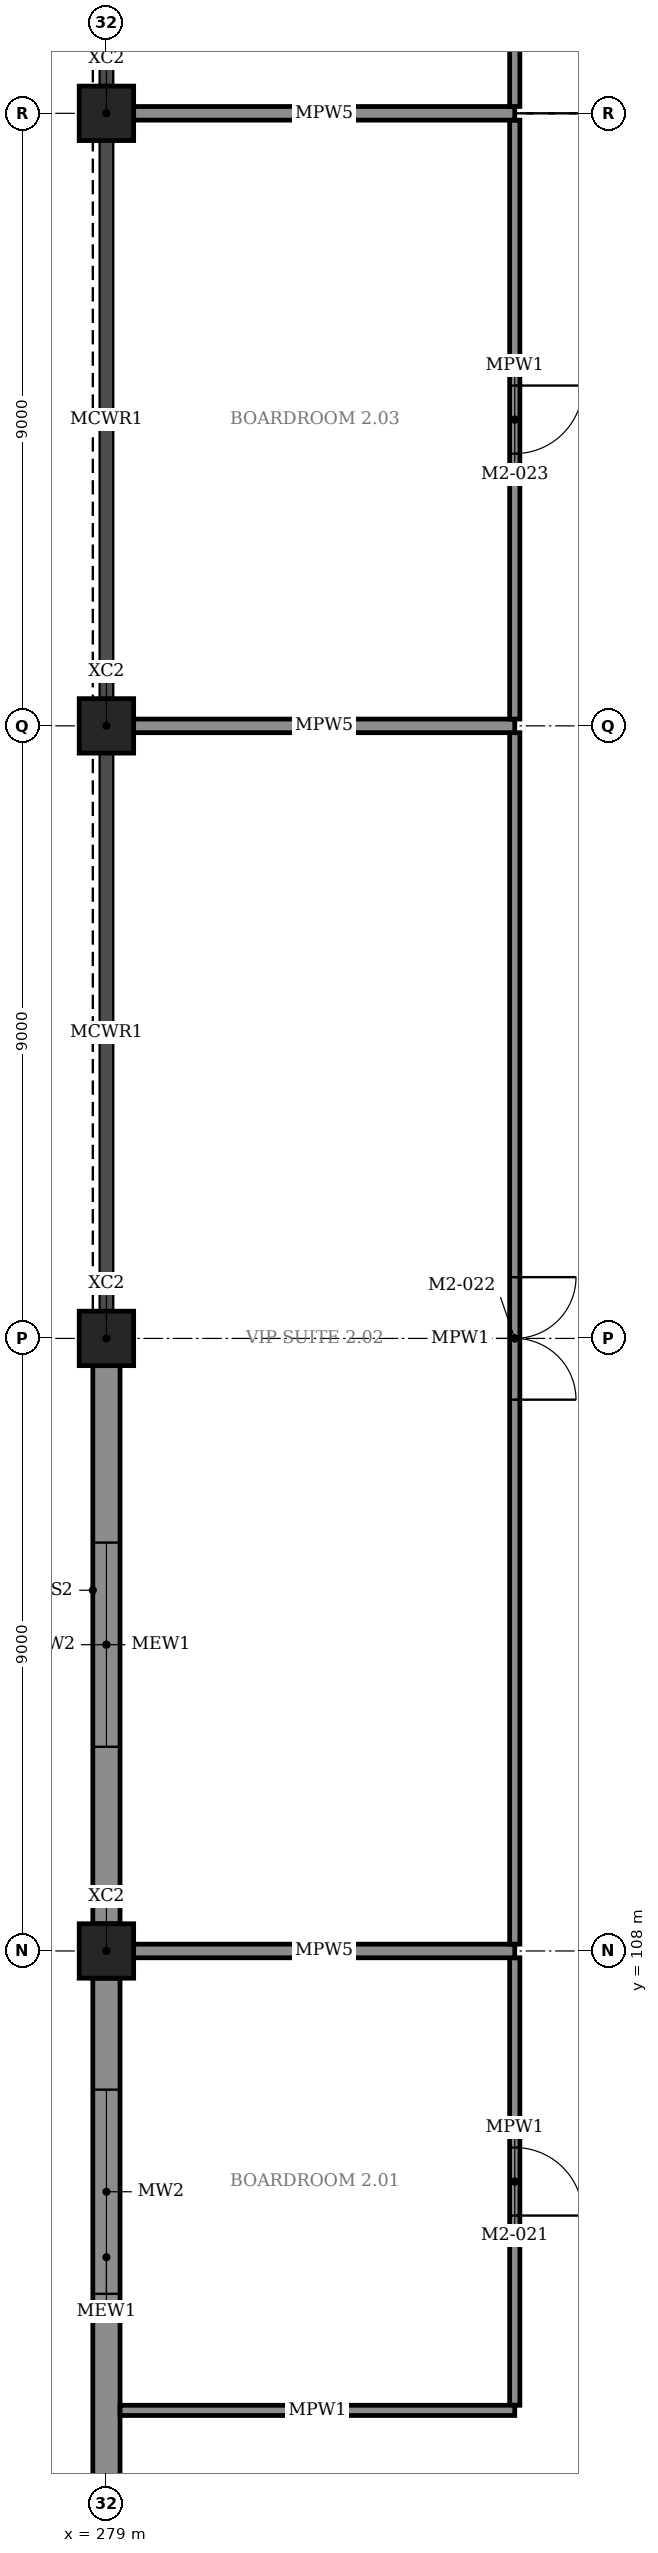
"""IFC4 building model, lengths in metres.
Left out: names, types, materials, properties, quantities, classifications, styles, units other than length and angle.
Written with IfcOpenShell. Run it as: python <this file> out.ifc"""

import sys

from ifc_helpers import new_model, si_unit, direction, frame, frame_2d, origin, origin_2d, place, context, subcontext, project, spatial, rectangle, extrude, element, fill, save


model = new_model("IFC4")
c1 = context("Model", 3, precision=1e-05, world=origin(), true_north=direction((0.0, 1.0)))
c2 = subcontext(c1, "Body", "Model", "MODEL_VIEW")
j1 = project(units=[si_unit("LENGTHUNIT", "METRE"), si_unit("PLANEANGLEUNIT", "RADIAN")], contexts=[c1])
p1 = place(None, origin())
s1 = spatial("IfcSite", under=j1, at=p1, CompositionType="ELEMENT")
p2 = place(p1, origin())
s2 = spatial("IfcBuilding", under=s1, at=p2, CompositionType="ELEMENT")
p3 = place(p2, frame((0.0, 0.0, 11.5)))
s3 = spatial("IfcBuildingStorey", under=s2, at=p3, CompositionType="ELEMENT", Elevation=11.5)
for number, where, z_axis, x_axis in (
    (1, (279.0, 108.0, 0.0), (0.0, 0.0, 1.0), (1.0, 0.0, 0.0)),
    (2, (279.0, 117.0, 0.0), (0.0, 0.0, 1.0), (1.0, 0.0, 0.0)),
    (3, (279.0, 126.0, 0.0), (0.0, 0.0, 1.0), (1.0, 0.0, 0.0)),
    (4, (279.0, 135.0, 0.0), (0.0, 0.0, 1.0), (1.0, 0.0, 0.0)),
):
    element("IfcColumn", number, at=place(p3, frame(where, z_axis=z_axis, x_axis=x_axis)), inside=s3, PredefinedType="COLUMN", context=c2, shape_type="SweptSolid", body=[
        extrude(rectangle(XDim=0.8, YDim=0.8, at=origin_2d()), origin(), (0.0, 0.0, 1.0), 5.5),
    ])
p4 = place(p3, frame((279.0, 99.4, 0.0), z_axis=(0.0, 0.0, 1.0), x_axis=(0.0, 1.0, 0.0)))
e5 = element("IfcWall", 5, at=p4, inside=s3, PredefinedType="STANDARD", context=c2, shape_type="SweptSolid", body=[
    extrude(rectangle(XDim=8.2, YDim=0.4, at=frame_2d((4.1, 0.0))), origin(), (0.0, 0.0, 1.0), 4.32),
])
p5 = place(p4, frame((3.562, 0.0, 0.9)))
e6 = element("IfcOpeningElement", 6, at=p5, cuts=e5, PredefinedType="OPENING", context=c2, shape_type="SweptSolid", body=[
    extrude(rectangle(XDim=3.0, YDim=2.1, at=frame_2d((1.5, 1.05))), frame((0.0, 0.21, 0.0), z_axis=(0.0, -1.0, 0.0), x_axis=(1.0, 0.0, 0.0)), (0.0, 0.0, 1.0), 0.42),
])
p6 = place(p3, frame((279.0, 108.4, 0.0), z_axis=(0.0, 0.0, 1.0), x_axis=(0.0, 1.0, 0.0)))
e7 = element("IfcWall", 7, at=p6, inside=s3, PredefinedType="STANDARD", context=c2, shape_type="SweptSolid", body=[
    extrude(rectangle(XDim=8.2, YDim=0.4, at=frame_2d((4.1, 0.0))), origin(), (0.0, 0.0, 1.0), 4.32),
])
p7 = place(p6, frame((2.6, 0.0, 0.9)))
e8 = element("IfcOpeningElement", 8, at=p7, cuts=e7, PredefinedType="OPENING", context=c2, shape_type="SweptSolid", body=[
    extrude(rectangle(XDim=3.0, YDim=2.1, at=frame_2d((1.5, 1.05))), frame((0.0, 0.21, 0.0), z_axis=(0.0, -1.0, 0.0), x_axis=(1.0, 0.0, 0.0)), (0.0, 0.0, 1.0), 0.42),
])
p8 = place(p3, frame((279.2, 101.25, 0.0), z_axis=(0.0, 0.0, 1.0), x_axis=(1.0, 0.0, 0.0)))
e9 = element("IfcWall", 9, at=p8, inside=s3, PredefinedType="PARTITIONING", context=c2, shape_type="SweptSolid", body=[
    extrude(rectangle(XDim=5.8, YDim=0.15, at=frame_2d((2.9, 0.0))), origin(), (0.0, 0.0, 1.0), 4.32),
])
p9 = place(p3, frame((279.4, 108.0, 0.0), z_axis=(0.0, 0.0, 1.0), x_axis=(1.0, 0.0, 0.0)))
e10 = element("IfcWall", 10, at=p9, inside=s3, PredefinedType="PARTITIONING", context=c2, shape_type="SweptSolid", body=[
    extrude(rectangle(XDim=5.6, YDim=0.2, at=frame_2d((2.8, 0.0))), origin(), (0.0, 0.0, 1.0), 4.32),
])
p10 = place(p3, frame((285.0, 101.325, 0.0), z_axis=(0.0, 0.0, 1.0), x_axis=(0.0, 1.0, 0.0)))
e11 = element("IfcWall", 11, at=p10, inside=s3, PredefinedType="PARTITIONING", context=c2, shape_type="SweptSolid", body=[
    extrude(rectangle(XDim=6.575, YDim=0.15, at=frame_2d((3.288, 0.0))), origin(), (0.0, 0.0, 1.0), 4.32),
])
p11 = place(p10, frame((2.787, 0.0, 0.0)))
e12 = element("IfcOpeningElement", 12, at=p11, cuts=e11, PredefinedType="OPENING", context=c2, shape_type="SweptSolid", body=[
    extrude(rectangle(XDim=1.0, YDim=2.4, at=frame_2d((0.5, 1.2))), frame((0.0, 0.085, 0.0), z_axis=(0.0, -1.0, 0.0), x_axis=(1.0, 0.0, 0.0)), (0.0, 0.0, 1.0), 0.17),
])
p12 = place(p3, frame((279.4, 126.0, 0.0), z_axis=(0.0, 0.0, 1.0), x_axis=(1.0, 0.0, 0.0)))
e13 = element("IfcWall", 13, at=p12, inside=s3, PredefinedType="PARTITIONING", context=c2, shape_type="SweptSolid", body=[
    extrude(rectangle(XDim=5.6, YDim=0.2, at=frame_2d((2.8, 0.0))), origin(), (0.0, 0.0, 1.0), 4.32),
])
p13 = place(p3, frame((285.0, 108.1, 0.0), z_axis=(0.0, 0.0, 1.0), x_axis=(0.0, 1.0, 0.0)))
e14 = element("IfcWall", 14, at=p13, inside=s3, PredefinedType="PARTITIONING", context=c2, shape_type="SweptSolid", body=[
    extrude(rectangle(XDim=17.8, YDim=0.15, at=frame_2d((8.9, 0.0))), origin(), (0.0, 0.0, 1.0), 4.32),
])
p14 = place(p13, frame((8.0, 0.0, 0.0)))
e15 = element("IfcOpeningElement", 15, at=p14, cuts=e14, PredefinedType="OPENING", context=c2, shape_type="SweptSolid", body=[
    extrude(rectangle(XDim=1.8, YDim=2.4, at=frame_2d((0.9, 1.2))), frame((0.0, 0.085, 0.0), z_axis=(0.0, -1.0, 0.0), x_axis=(1.0, 0.0, 0.0)), (0.0, 0.0, 1.0), 0.17),
])
p15 = place(p3, frame((279.4, 135.0, 0.0), z_axis=(0.0, 0.0, 1.0), x_axis=(1.0, 0.0, 0.0)))
e16 = element("IfcWall", 16, at=p15, inside=s3, PredefinedType="PARTITIONING", context=c2, shape_type="SweptSolid", body=[
    extrude(rectangle(XDim=5.6, YDim=0.2, at=frame_2d((2.8, 0.0))), origin(), (0.0, 0.0, 1.0), 4.32),
])
p16 = place(p3, frame((285.0, 126.1, 0.0), z_axis=(0.0, 0.0, 1.0), x_axis=(0.0, 1.0, 0.0)))
e17 = element("IfcWall", 17, at=p16, inside=s3, PredefinedType="PARTITIONING", context=c2, shape_type="SweptSolid", body=[
    extrude(rectangle(XDim=8.8, YDim=0.15, at=frame_2d((4.4, 0.0))), origin(), (0.0, 0.0, 1.0), 4.32),
])
p17 = place(p16, frame((3.9, 0.0, 0.0)))
e18 = element("IfcOpeningElement", 18, at=p17, cuts=e17, PredefinedType="OPENING", context=c2, shape_type="SweptSolid", body=[
    extrude(rectangle(XDim=1.0, YDim=2.4, at=frame_2d((0.5, 1.2))), frame((0.0, 0.085, 0.0), z_axis=(0.0, -1.0, 0.0), x_axis=(1.0, 0.0, 0.0)), (0.0, 0.0, 1.0), 0.17),
])
p18 = place(p3, frame((285.0, 135.1, 0.0), z_axis=(0.0, 0.0, 1.0), x_axis=(0.0, 1.0, 0.0)))
e19 = element("IfcWall", 19, at=p18, inside=s3, PredefinedType="PARTITIONING", context=c2, shape_type="SweptSolid", body=[
    extrude(rectangle(XDim=8.8, YDim=0.15, at=frame_2d((4.4, 0.0))), origin(), (0.0, 0.0, 1.0), 4.32),
])
p19 = place(p18, frame((3.9, 0.0, 0.0)))
e20 = element("IfcOpeningElement", 20, at=p19, cuts=e19, PredefinedType="OPENING", context=c2, shape_type="SweptSolid", body=[
    extrude(rectangle(XDim=1.0, YDim=2.4, at=frame_2d((0.5, 1.2))), frame((0.0, 0.085, 0.0), z_axis=(0.0, -1.0, 0.0), x_axis=(1.0, 0.0, 0.0)), (0.0, 0.0, 1.0), 0.17),
])
p20 = place(p5, origin())
e21 = element("IfcWindow", 21, at=p20, inside=s3, PartitioningType="TRIPLE_PANEL_VERTICAL", PredefinedType="WINDOW", context=c2, shape_type="SweptSolid", body=[
    extrude(rectangle(XDim=3.0, YDim=2.1, at=frame_2d((1.5, 1.05))), frame((0.0, 0.03, 0.0), z_axis=(0.0, -1.0, 0.0), x_axis=(1.0, 0.0, 0.0)), (0.0, 0.0, 1.0), 0.06),
])
fill(e6, e21)
p21 = place(p7, origin())
e22 = element("IfcWindow", 22, at=p21, inside=s3, PartitioningType="TRIPLE_PANEL_VERTICAL", PredefinedType="WINDOW", context=c2, shape_type="SweptSolid", body=[
    extrude(rectangle(XDim=3.0, YDim=2.1, at=frame_2d((1.5, 1.05))), frame((0.0, 0.03, 0.0), z_axis=(0.0, -1.0, 0.0), x_axis=(1.0, 0.0, 0.0)), (0.0, 0.0, 1.0), 0.06),
])
fill(e8, e22)
p22 = place(p11, frame((1.0, 0.0, 0.0), z_axis=(0.0, 0.0, 1.0), x_axis=(-1.0, 0.0, 0.0)))
e23 = element("IfcDoor", 23, at=p22, inside=s3, OperationType="SINGLE_SWING_LEFT", PredefinedType="DOOR", context=c2, shape_type="SweptSolid", body=[
    extrude(rectangle(XDim=1.0, YDim=2.4, at=frame_2d((0.5, 1.2))), frame((0.0, 0.025, 0.0), z_axis=(0.0, -1.0, 0.0), x_axis=(1.0, 0.0, 0.0)), (0.0, 0.0, 1.0), 0.05),
])
fill(e12, e23)
p23 = place(p14, frame((1.8, 0.0, 0.0), z_axis=(0.0, 0.0, 1.0), x_axis=(-1.0, 0.0, 0.0)))
e24 = element("IfcDoor", 24, at=p23, inside=s3, OperationType="DOUBLE_DOOR_SINGLE_SWING", PredefinedType="DOOR", context=c2, shape_type="SweptSolid", body=[
    extrude(rectangle(XDim=1.8, YDim=2.4, at=frame_2d((0.9, 1.2))), frame((0.0, 0.025, 0.0), z_axis=(0.0, -1.0, 0.0), x_axis=(1.0, 0.0, 0.0)), (0.0, 0.0, 1.0), 0.05),
])
fill(e15, e24)
p24 = place(p17, frame((1.0, 0.0, 0.0), z_axis=(0.0, 0.0, 1.0), x_axis=(-1.0, 0.0, 0.0)))
e25 = element("IfcDoor", 25, at=p24, inside=s3, OperationType="SINGLE_SWING_RIGHT", PredefinedType="DOOR", context=c2, shape_type="SweptSolid", body=[
    extrude(rectangle(XDim=1.0, YDim=2.4, at=frame_2d((0.5, 1.2))), frame((0.0, 0.025, 0.0), z_axis=(0.0, -1.0, 0.0), x_axis=(1.0, 0.0, 0.0)), (0.0, 0.0, 1.0), 0.05),
])
fill(e18, e25)
save(model, sys.argv[1])
